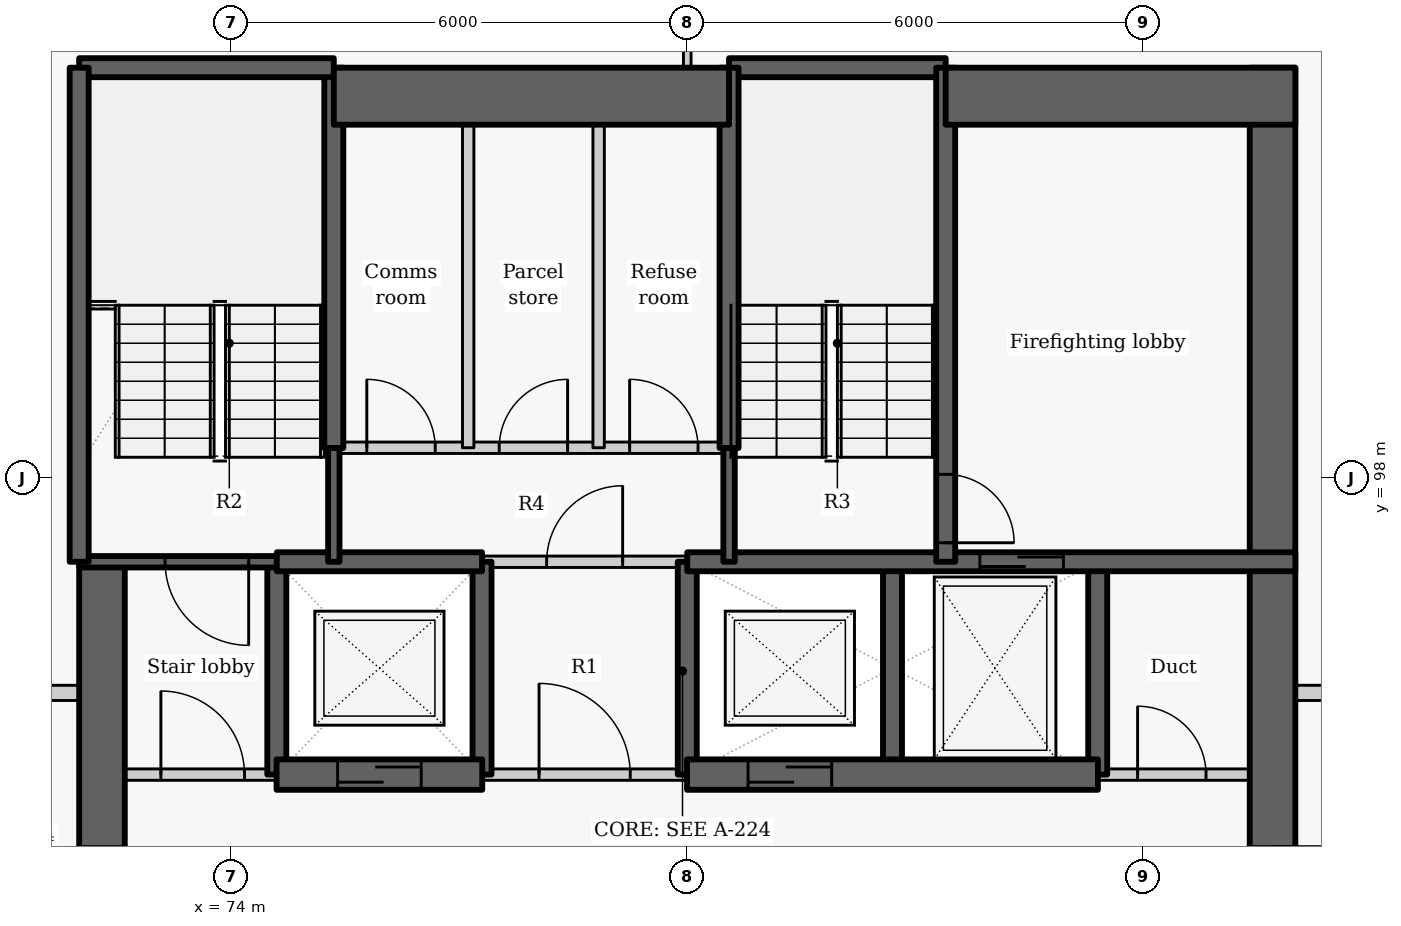
"""IFC4 building model, lengths in metres.
Left out: names, types, materials, properties, quantities, classifications, styles, units other than length and angle.
Written with IfcOpenShell. Run it as: python <this file> out.ifc"""

import sys

from ifc_helpers import new_model, si_unit, direction, frame, frame_2d, origin, place, context, subcontext, project, spatial, rectangle, extrude, element, fill, save


model = new_model("IFC4")
c1 = context("Model", 3, precision=1e-05, world=origin(), true_north=direction((0.0, 1.0)))
c2 = subcontext(c1, "Body", "Model", "MODEL_VIEW")
j1 = project(units=[si_unit("LENGTHUNIT", "METRE"), si_unit("PLANEANGLEUNIT", "RADIAN")], contexts=[c1])
p1 = place(None, origin())
s1 = spatial("IfcSite", under=j1, at=p1, CompositionType="ELEMENT")
p2 = place(p1, origin())
s2 = spatial("IfcBuilding", under=s1, at=p2, CompositionType="ELEMENT")
p3 = place(p2, frame((0.0, 0.0, 127.2)))
s3 = spatial("IfcBuildingStorey", under=s2, at=p3, CompositionType="ELEMENT", Elevation=127.2)
p4 = place(p3, frame((74.6, 94.1, -0.41), z_axis=(0.0, 0.0, 1.0), x_axis=(0.0, 1.0, 0.0)))
e1 = element("IfcWall", 1, at=p4, inside=s3, PredefinedType="SHEAR", context=c2, shape_type="SweptSolid", body=[
    extrude(rectangle(XDim=2.8, YDim=0.25, at=frame_2d((1.4, 0.0))), origin(), (0.0, 0.0, 1.0), 3.435),
])
p5 = place(p3, frame((72.3, 87.8, -0.41), z_axis=(0.0, 0.0, 1.0), x_axis=(0.0, 1.0, 0.0)))
e2 = element("IfcWall", 2, at=p5, inside=s3, PredefinedType="SHEAR", context=c2, shape_type="SweptSolid", body=[
    extrude(rectangle(XDim=9.1, YDim=0.6, at=frame_2d((4.55, 0.0))), origin(), (0.0, 0.0, 1.0), 3.435),
])
p6 = place(p5, frame((3.852, 0.0, 0.41)))
e3 = element("IfcOpeningElement", 3, at=p6, cuts=e2, PredefinedType="OPENING", context=c2, shape_type="SweptSolid", body=[
    extrude(rectangle(XDim=1.5, YDim=2.1, at=frame_2d((0.75, 1.05))), frame((0.0, 0.31, 0.0), z_axis=(0.0, -1.0, 0.0), x_axis=(1.0, 0.0, 0.0)), (0.0, 0.0, 1.0), 0.62),
])
for number, where, z_axis, x_axis in (
    (4, (77.3, 94.1, -0.41), (0.0, 0.0, 1.0), (0.0, 1.0, 0.0)),
    (5, (80.0, 94.1, -0.41), (0.0, 0.0, 1.0), (0.0, 1.0, 0.0)),
    (6, (82.7, 94.1, -0.41), (0.0, 0.0, 1.0), (0.0, 1.0, 0.0)),
    (7, (85.4, 94.1, -0.41), (0.0, 0.0, 1.0), (0.0, 1.0, 0.0)),
):
    element("IfcWall", number, at=place(p3, frame(where, z_axis=z_axis, x_axis=x_axis)), inside=s3, PredefinedType="SHEAR", context=c2, shape_type="SweptSolid", body=[
        extrude(rectangle(XDim=2.8, YDim=0.25, at=frame_2d((1.4, 0.0))), origin(), (0.0, 0.0, 1.0), 3.435),
    ])
p7 = place(p3, frame((87.7, 103.4, -0.41), z_axis=(0.0, 0.0, 1.0), x_axis=(0.0, -1.0, 0.0)))
e8 = element("IfcWall", 8, at=p7, inside=s3, PredefinedType="SHEAR", context=c2, shape_type="SweptSolid", body=[
    extrude(rectangle(XDim=15.6, YDim=0.6, at=frame_2d((7.8, 0.0))), origin(), (0.0, 0.0, 1.0), 3.435),
])
p8 = place(p7, frame((10.248, 0.0, 0.41)))
e9 = element("IfcOpeningElement", 9, at=p8, cuts=e8, PredefinedType="OPENING", context=c2, shape_type="SweptSolid", body=[
    extrude(rectangle(XDim=1.5, YDim=2.1, at=frame_2d((0.75, 1.05))), frame((0.0, 0.31, 0.0), z_axis=(0.0, -1.0, 0.0), x_axis=(1.0, 0.0, 0.0)), (0.0, 0.0, 1.0), 0.62),
])
p9 = place(p3, frame((72.0, 94.1, 0.0), z_axis=(0.0, 0.0, 1.0), x_axis=(1.0, 0.0, 0.0)))
e10 = element("IfcWall", 10, at=p9, inside=s3, PredefinedType="PARTITIONING", context=c2, shape_type="SweptSolid", body=[
    extrude(rectangle(XDim=2.603, YDim=0.15, at=frame_2d((1.302, 0.0))), origin(), (0.0, 0.0, 1.0), 3.025),
])
p10 = place(p9, frame((1.075, 0.0, 0.0)))
e11 = element("IfcOpeningElement", 11, at=p10, cuts=e10, PredefinedType="OPENING", context=c2, shape_type="SweptSolid", body=[
    extrude(rectangle(XDim=1.1, YDim=2.1, at=frame_2d((0.55, 1.05))), frame((0.0, 0.085, 0.0), z_axis=(0.0, -1.0, 0.0), x_axis=(1.0, 0.0, 0.0)), (0.0, 0.0, 1.0), 0.17),
])
p11 = place(p3, frame((77.297, 94.1, 0.0), z_axis=(0.0, 0.0, 1.0), x_axis=(1.0, 0.0, 0.0)))
e12 = element("IfcWall", 12, at=p11, inside=s3, PredefinedType="PARTITIONING", context=c2, shape_type="SweptSolid", body=[
    extrude(rectangle(XDim=2.706, YDim=0.15, at=frame_2d((1.353, 0.0))), origin(), (0.0, 0.0, 1.0), 3.025),
])
p12 = place(p11, frame((0.753, 0.0, 0.0)))
e13 = element("IfcOpeningElement", 13, at=p12, cuts=e12, PredefinedType="OPENING", context=c2, shape_type="SweptSolid", body=[
    extrude(rectangle(XDim=1.2, YDim=2.1, at=frame_2d((0.6, 1.05))), frame((0.0, 0.085, 0.0), z_axis=(0.0, -1.0, 0.0), x_axis=(1.0, 0.0, 0.0)), (0.0, 0.0, 1.0), 0.17),
])
p13 = place(p3, frame((85.397, 94.1, 0.0), z_axis=(0.0, 0.0, 1.0), x_axis=(1.0, 0.0, 0.0)))
e14 = element("IfcWall", 14, at=p13, inside=s3, PredefinedType="PARTITIONING", context=c2, shape_type="SweptSolid", body=[
    extrude(rectangle(XDim=2.603, YDim=0.15, at=frame_2d((1.302, 0.0))), origin(), (0.0, 0.0, 1.0), 3.025),
])
p14 = place(p13, frame((0.528, 0.0, 0.0)))
e15 = element("IfcOpeningElement", 15, at=p14, cuts=e14, PredefinedType="OPENING", context=c2, shape_type="SweptSolid", body=[
    extrude(rectangle(XDim=0.9, YDim=2.1, at=frame_2d((0.45, 1.05))), frame((0.0, 0.085, 0.0), z_axis=(0.0, -1.0, 0.0), x_axis=(1.0, 0.0, 0.0)), (0.0, 0.0, 1.0), 0.17),
])
p15 = place(p3, frame((74.597, 94.1, -0.41), z_axis=(0.0, 0.0, 1.0), x_axis=(1.0, 0.0, 0.0)))
e16 = element("IfcWall", 16, at=p15, inside=s3, PredefinedType="SHEAR", context=c2, shape_type="SweptSolid", body=[
    extrude(rectangle(XDim=2.706, YDim=0.4, at=frame_2d((1.353, 0.0))), origin(), (0.0, 0.0, 1.0), 3.435),
])
p16 = place(p15, frame((0.803, 0.0, 0.41)))
e17 = element("IfcOpeningElement", 17, at=p16, cuts=e16, PredefinedType="OPENING", context=c2, shape_type="SweptSolid", body=[
    extrude(rectangle(XDim=1.1, YDim=2.1, at=frame_2d((0.55, 1.05))), frame((0.0, 0.21, 0.0), z_axis=(0.0, -1.0, 0.0), x_axis=(1.0, 0.0, 0.0)), (0.0, 0.0, 1.0), 0.42),
])
p17 = place(p3, frame((79.997, 94.1, -0.41), z_axis=(0.0, 0.0, 1.0), x_axis=(1.0, 0.0, 0.0)))
e18 = element("IfcWall", 18, at=p17, inside=s3, PredefinedType="SHEAR", context=c2, shape_type="SweptSolid", body=[
    extrude(rectangle(XDim=5.406, YDim=0.4, at=frame_2d((2.703, 0.0))), origin(), (0.0, 0.0, 1.0), 3.435),
])
p18 = place(p17, frame((0.803, 0.0, 0.41)))
e19 = element("IfcOpeningElement", 19, at=p18, cuts=e18, PredefinedType="OPENING", context=c2, shape_type="SweptSolid", body=[
    extrude(rectangle(XDim=1.1, YDim=2.1, at=frame_2d((0.55, 1.05))), frame((0.0, 0.21, 0.0), z_axis=(0.0, -1.0, 0.0), x_axis=(1.0, 0.0, 0.0)), (0.0, 0.0, 1.0), 0.42),
])
p19 = place(p3, frame((74.6, 96.9, -0.41), z_axis=(0.0, 0.0, 1.0), x_axis=(-1.0, 0.0, 0.0)))
e20 = element("IfcWall", 20, at=p19, inside=s3, PredefinedType="SHEAR", context=c2, shape_type="SweptSolid", body=[
    extrude(rectangle(XDim=2.6, YDim=0.15, at=frame_2d((1.3, 0.0))), origin(), (0.0, 0.0, 1.0), 3.435),
])
p20 = place(p19, frame((0.37, 0.0, 0.41)))
e21 = element("IfcOpeningElement", 21, at=p20, cuts=e20, PredefinedType="OPENING", context=c2, shape_type="SweptSolid", body=[
    extrude(rectangle(XDim=1.1, YDim=2.1, at=frame_2d((0.55, 1.05))), frame((0.0, 0.085, 0.0), z_axis=(0.0, -1.0, 0.0), x_axis=(1.0, 0.0, 0.0)), (0.0, 0.0, 1.0), 0.17),
])
p21 = place(p3, frame((74.6, 96.9, -0.41), z_axis=(0.0, 0.0, 1.0), x_axis=(1.0, 0.0, 0.0)))
e22 = element("IfcWall", 22, at=p21, inside=s3, PredefinedType="SHEAR", context=c2, shape_type="SweptSolid", body=[
    extrude(rectangle(XDim=2.7, YDim=0.25, at=frame_2d((1.35, 0.0))), origin(), (0.0, 0.0, 1.0), 3.435),
])
p22 = place(p3, frame((80.0, 96.9, -0.41), z_axis=(0.0, 0.0, 1.0), x_axis=(1.0, 0.0, 0.0)))
e23 = element("IfcWall", 23, at=p22, inside=s3, PredefinedType="SHEAR", context=c2, shape_type="SweptSolid", body=[
    extrude(rectangle(XDim=8.0, YDim=0.25, at=frame_2d((4.0, 0.0))), origin(), (0.0, 0.0, 1.0), 3.435),
])
p23 = place(p22, frame((3.849, 0.0, 0.41)))
e24 = element("IfcOpeningElement", 24, at=p23, cuts=e23, PredefinedType="OPENING", context=c2, shape_type="SweptSolid", body=[
    extrude(rectangle(XDim=1.1, YDim=2.1, at=frame_2d((0.55, 1.05))), frame((0.0, 0.135, 0.0), z_axis=(0.0, -1.0, 0.0), x_axis=(1.0, 0.0, 0.0)), (0.0, 0.0, 1.0), 0.27),
])
p24 = place(p3, frame((77.3, 96.9, 0.0), z_axis=(0.0, 0.0, 1.0), x_axis=(1.0, 0.0, 0.0)))
e25 = element("IfcWall", 25, at=p24, inside=s3, PredefinedType="PARTITIONING", context=c2, shape_type="SweptSolid", body=[
    extrude(rectangle(XDim=2.7, YDim=0.15, at=frame_2d((1.35, 0.0))), origin(), (0.0, 0.0, 1.0), 3.025),
])
p25 = place(p24, frame((0.85, 0.0, 0.0)))
e26 = element("IfcOpeningElement", 26, at=p25, cuts=e25, PredefinedType="OPENING", context=c2, shape_type="SweptSolid", body=[
    extrude(rectangle(XDim=1.0, YDim=2.1, at=frame_2d((0.5, 1.05))), frame((0.0, 0.085, 0.0), z_axis=(0.0, -1.0, 0.0), x_axis=(1.0, 0.0, 0.0)), (0.0, 0.0, 1.0), 0.17),
])
p26 = place(p3, frame((75.35, 96.9, -0.41), z_axis=(0.0, 0.0, 1.0), x_axis=(0.0, 1.0, 0.0)))
e27 = element("IfcWall", 27, at=p26, inside=s3, PredefinedType="SHEAR", context=c2, shape_type="SweptSolid", body=[
    extrude(rectangle(XDim=1.503, YDim=0.15, at=frame_2d((0.751, 0.0))), origin(), (0.0, 0.0, 1.0), 3.435),
])
p27 = place(p3, frame((75.35, 98.397, -0.41), z_axis=(0.0, 0.0, 1.0), x_axis=(0.0, 1.0, 0.0)))
e28 = element("IfcWall", 28, at=p27, inside=s3, PredefinedType="SHEAR", context=c2, shape_type="SweptSolid", body=[
    extrude(rectangle(XDim=5.003, YDim=0.25, at=frame_2d((2.501, 0.0))), origin(), (0.0, 0.0, 1.0), 3.435),
])
p28 = place(p3, frame((72.0, 103.4, 0.0), z_axis=(0.0, 0.0, 1.0), x_axis=(1.0, 0.0, 0.0)))
e29 = element("IfcWall", 29, at=p28, inside=s3, PredefinedType="SHEAR", context=c2, shape_type="SweptSolid", body=[
    extrude(rectangle(XDim=3.35, YDim=0.25, at=frame_2d((1.675, 0.0))), origin(), (0.0, 0.0, 1.0), 3.025),
])
p29 = place(p3, frame((80.55, 103.4, 0.0), z_axis=(0.0, 0.0, 1.0), x_axis=(1.0, 0.0, 0.0)))
e30 = element("IfcWall", 30, at=p29, inside=s3, PredefinedType="SHEAR", context=c2, shape_type="SweptSolid", body=[
    extrude(rectangle(XDim=2.85, YDim=0.25, at=frame_2d((1.425, 0.0))), origin(), (0.0, 0.0, 1.0), 3.025),
])
p30 = place(p3, frame((72.0, 96.9, -0.41), z_axis=(0.0, 0.0, 1.0), x_axis=(0.0, 1.0, 0.0)))
e31 = element("IfcWall", 31, at=p30, inside=s3, PredefinedType="SHEAR", context=c2, shape_type="SweptSolid", body=[
    extrude(rectangle(XDim=6.5, YDim=0.25, at=frame_2d((3.25, 0.0))), origin(), (0.0, 0.0, 1.0), 3.435),
])
p31 = place(p3, frame((83.4, 103.4, -0.41), z_axis=(0.0, 0.0, 1.0), x_axis=(0.0, -1.0, 0.0)))
e32 = element("IfcWall", 32, at=p31, inside=s3, PredefinedType="SHEAR", context=c2, shape_type="SweptSolid", body=[
    extrude(rectangle(XDim=6.5, YDim=0.25, at=frame_2d((3.25, 0.0))), origin(), (0.0, 0.0, 1.0), 3.435),
])
p32 = place(p31, frame((5.35, 0.0, 0.41)))
e33 = element("IfcOpeningElement", 33, at=p32, cuts=e32, PredefinedType="OPENING", context=c2, shape_type="SweptSolid", body=[
    extrude(rectangle(XDim=0.9, YDim=2.1, at=frame_2d((0.45, 1.05))), frame((0.0, 0.135, 0.0), z_axis=(0.0, -1.0, 0.0), x_axis=(1.0, 0.0, 0.0)), (0.0, 0.0, 1.0), 0.27),
])
p33 = place(p3, frame((80.55, 96.9, -0.41), z_axis=(0.0, 0.0, 1.0), x_axis=(0.0, 1.0, 0.0)))
e34 = element("IfcWall", 34, at=p33, inside=s3, PredefinedType="SHEAR", context=c2, shape_type="SweptSolid", body=[
    extrude(rectangle(XDim=1.503, YDim=0.15, at=frame_2d((0.751, 0.0))), origin(), (0.0, 0.0, 1.0), 3.435),
])
p34 = place(p3, frame((80.55, 98.397, -0.41), z_axis=(0.0, 0.0, 1.0), x_axis=(0.0, 1.0, 0.0)))
e35 = element("IfcWall", 35, at=p34, inside=s3, PredefinedType="SHEAR", context=c2, shape_type="SweptSolid", body=[
    extrude(rectangle(XDim=5.003, YDim=0.25, at=frame_2d((2.501, 0.0))), origin(), (0.0, 0.0, 1.0), 3.435),
])
p35 = place(p3, frame((75.35, 103.025, -0.41), z_axis=(0.0, 0.0, 1.0), x_axis=(1.0, 0.0, 0.0)))
e36 = element("IfcWall", 36, at=p35, inside=s3, PredefinedType="SHEAR", context=c2, shape_type="SweptSolid", body=[
    extrude(rectangle(XDim=5.2, YDim=0.75, at=frame_2d((2.6, 0.0))), origin(), (0.0, 0.0, 1.0), 3.435),
])
p36 = place(p3, frame((83.4, 103.025, -0.41), z_axis=(0.0, 0.0, 1.0), x_axis=(1.0, 0.0, 0.0)))
e37 = element("IfcWall", 37, at=p36, inside=s3, PredefinedType="SHEAR", context=c2, shape_type="SweptSolid", body=[
    extrude(rectangle(XDim=4.6, YDim=0.75, at=frame_2d((2.3, 0.0))), origin(), (0.0, 0.0, 1.0), 3.435),
])
p37 = place(p3, frame((75.35, 98.4, 0.0), z_axis=(0.0, 0.0, 1.0), x_axis=(1.0, 0.0, 0.0)))
e38 = element("IfcWall", 38, at=p37, inside=s3, PredefinedType="PARTITIONING", context=c2, shape_type="SweptSolid", body=[
    extrude(rectangle(XDim=5.2, YDim=0.15, at=frame_2d((2.6, 0.0))), origin(), (0.0, 0.0, 1.0), 3.025),
])
p38 = place(p37, frame((0.434, 0.0, 0.0)))
e39 = element("IfcOpeningElement", 39, at=p38, cuts=e38, PredefinedType="OPENING", context=c2, shape_type="SweptSolid", body=[
    extrude(rectangle(XDim=0.9, YDim=2.1, at=frame_2d((0.45, 1.05))), frame((0.0, 0.085, 0.0), z_axis=(0.0, -1.0, 0.0), x_axis=(1.0, 0.0, 0.0)), (0.0, 0.0, 1.0), 0.17),
])
p39 = place(p37, frame((2.176, 0.0, 0.0)))
e40 = element("IfcOpeningElement", 40, at=p39, cuts=e38, PredefinedType="OPENING", context=c2, shape_type="SweptSolid", body=[
    extrude(rectangle(XDim=0.9, YDim=2.1, at=frame_2d((0.45, 1.05))), frame((0.0, 0.085, 0.0), z_axis=(0.0, -1.0, 0.0), x_axis=(1.0, 0.0, 0.0)), (0.0, 0.0, 1.0), 0.17),
])
p40 = place(p37, frame((3.892, 0.0, 0.0)))
e41 = element("IfcOpeningElement", 41, at=p40, cuts=e38, PredefinedType="OPENING", context=c2, shape_type="SweptSolid", body=[
    extrude(rectangle(XDim=0.9, YDim=2.1, at=frame_2d((0.45, 1.05))), frame((0.0, 0.085, 0.0), z_axis=(0.0, -1.0, 0.0), x_axis=(1.0, 0.0, 0.0)), (0.0, 0.0, 1.0), 0.17),
])
for number, where, z_axis, x_axis in (
    (42, (77.118, 98.4, 0.0), (0.0, 0.0, 1.0), (0.0, 1.0, 0.0)),
    (43, (78.834, 98.4, 0.0), (0.0, 0.0, 1.0), (0.0, 1.0, 0.0)),
):
    element("IfcWall", number, at=place(p3, frame(where, z_axis=z_axis, x_axis=x_axis)), inside=s3, PredefinedType="PARTITIONING", context=c2, shape_type="SweptSolid", body=[
        extrude(rectangle(XDim=5.0, YDim=0.15, at=frame_2d((2.5, 0.0))), origin(), (0.0, 0.0, 1.0), 3.025),
    ])
p41 = place(p3, frame((69.537, 95.175, 0.0), z_axis=(0.0, 0.0, 1.0), x_axis=(1.0, 0.0, 0.0)))
e44 = element("IfcWall", 44, at=p41, inside=s3, PredefinedType="PARTITIONING", context=c2, shape_type="SweptSolid", body=[
    extrude(rectangle(XDim=2.463, YDim=0.2, at=frame_2d((1.231, 0.0))), origin(), (0.0, 0.0, 1.0), 2.505),
])
p42 = place(p3, frame((88.0, 95.175, 0.0), z_axis=(0.0, 0.0, 1.0), x_axis=(1.0, 0.0, 0.0)))
e45 = element("IfcWall", 45, at=p42, inside=s3, PredefinedType="PARTITIONING", context=c2, shape_type="SweptSolid", body=[
    extrude(rectangle(XDim=1.423, YDim=0.2, at=frame_2d((0.711, 0.0))), origin(), (0.0, 0.0, 1.0), 3.025),
])
p43 = place(p3, frame((80.0, 103.4, 0.0), z_axis=(0.0, 0.0, 1.0), x_axis=(0.0, 1.0, 0.0)))
e46 = element("IfcWall", 46, at=p43, inside=s3, PredefinedType="PARTITIONING", context=c2, shape_type="SweptSolid", body=[
    extrude(rectangle(XDim=0.3, YDim=0.1, at=frame_2d((0.15, 0.0))), origin(), (0.0, 0.0, 1.0), 3.025),
])
p44 = place(p10, origin())
e47 = element("IfcDoor", 47, at=p44, inside=s3, OperationType="SINGLE_SWING_LEFT", PredefinedType="DOOR", context=c2, shape_type="SweptSolid", body=[
    extrude(rectangle(XDim=1.1, YDim=2.1, at=frame_2d((0.55, 1.05))), frame((0.0, 0.025, 0.0), z_axis=(0.0, -1.0, 0.0), x_axis=(1.0, 0.0, 0.0)), (0.0, 0.0, 1.0), 0.05),
])
fill(e11, e47)
p45 = place(p16, origin())
e48 = element("IfcDoor", 48, at=p45, inside=s3, OperationType="SLIDING_TO_LEFT", PredefinedType="DOOR", context=c2, shape_type="SweptSolid", body=[
    extrude(rectangle(XDim=1.1, YDim=2.1, at=frame_2d((0.55, 1.05))), frame((0.0, 0.025, 0.0), z_axis=(0.0, -1.0, 0.0), x_axis=(1.0, 0.0, 0.0)), (0.0, 0.0, 1.0), 0.05),
])
fill(e17, e48)
p46 = place(p12, origin())
e49 = element("IfcDoor", 49, at=p46, inside=s3, OperationType="DOUBLE_DOOR_SINGLE_SWING", PredefinedType="DOOR", context=c2, shape_type="SweptSolid", body=[
    extrude(rectangle(XDim=1.2, YDim=2.1, at=frame_2d((0.6, 1.05))), frame((0.0, 0.025, 0.0), z_axis=(0.0, -1.0, 0.0), x_axis=(1.0, 0.0, 0.0)), (0.0, 0.0, 1.0), 0.05),
])
fill(e13, e49)
p47 = place(p18, origin())
e50 = element("IfcDoor", 50, at=p47, inside=s3, OperationType="SLIDING_TO_LEFT", PredefinedType="DOOR", context=c2, shape_type="SweptSolid", body=[
    extrude(rectangle(XDim=1.1, YDim=2.1, at=frame_2d((0.55, 1.05))), frame((0.0, 0.025, 0.0), z_axis=(0.0, -1.0, 0.0), x_axis=(1.0, 0.0, 0.0)), (0.0, 0.0, 1.0), 0.05),
])
fill(e19, e50)
p48 = place(p23, origin())
e51 = element("IfcDoor", 51, at=p48, inside=s3, OperationType="SLIDING_TO_LEFT", PredefinedType="DOOR", context=c2, shape_type="SweptSolid", body=[
    extrude(rectangle(XDim=1.1, YDim=2.1, at=frame_2d((0.55, 1.05))), frame((0.0, 0.025, 0.0), z_axis=(0.0, -1.0, 0.0), x_axis=(1.0, 0.0, 0.0)), (0.0, 0.0, 1.0), 0.05),
])
fill(e24, e51)
p49 = place(p14, origin())
e52 = element("IfcDoor", 52, at=p49, inside=s3, OperationType="SINGLE_SWING_LEFT", PredefinedType="DOOR", context=c2, shape_type="SweptSolid", body=[
    extrude(rectangle(XDim=0.9, YDim=2.1, at=frame_2d((0.45, 1.05))), frame((0.0, 0.025, 0.0), z_axis=(0.0, -1.0, 0.0), x_axis=(1.0, 0.0, 0.0)), (0.0, 0.0, 1.0), 0.05),
])
fill(e15, e52)
p50 = place(p25, origin())
e53 = element("IfcDoor", 53, at=p50, inside=s3, OperationType="SINGLE_SWING_RIGHT", PredefinedType="DOOR", context=c2, shape_type="SweptSolid", body=[
    extrude(rectangle(XDim=1.0, YDim=2.1, at=frame_2d((0.5, 1.05))), frame((0.0, 0.025, 0.0), z_axis=(0.0, -1.0, 0.0), x_axis=(1.0, 0.0, 0.0)), (0.0, 0.0, 1.0), 0.05),
])
fill(e26, e53)
p51 = place(p38, origin())
e54 = element("IfcDoor", 54, at=p51, inside=s3, OperationType="SINGLE_SWING_LEFT", PredefinedType="DOOR", context=c2, shape_type="SweptSolid", body=[
    extrude(rectangle(XDim=0.9, YDim=2.1, at=frame_2d((0.45, 1.05))), frame((0.0, 0.025, 0.0), z_axis=(0.0, -1.0, 0.0), x_axis=(1.0, 0.0, 0.0)), (0.0, 0.0, 1.0), 0.05),
])
fill(e39, e54)
p52 = place(p39, origin())
e55 = element("IfcDoor", 55, at=p52, inside=s3, OperationType="SINGLE_SWING_RIGHT", PredefinedType="DOOR", context=c2, shape_type="SweptSolid", body=[
    extrude(rectangle(XDim=0.9, YDim=2.1, at=frame_2d((0.45, 1.05))), frame((0.0, 0.025, 0.0), z_axis=(0.0, -1.0, 0.0), x_axis=(1.0, 0.0, 0.0)), (0.0, 0.0, 1.0), 0.05),
])
fill(e40, e55)
p53 = place(p40, origin())
e56 = element("IfcDoor", 56, at=p53, inside=s3, OperationType="SINGLE_SWING_LEFT", PredefinedType="DOOR", context=c2, shape_type="SweptSolid", body=[
    extrude(rectangle(XDim=0.9, YDim=2.1, at=frame_2d((0.45, 1.05))), frame((0.0, 0.025, 0.0), z_axis=(0.0, -1.0, 0.0), x_axis=(1.0, 0.0, 0.0)), (0.0, 0.0, 1.0), 0.05),
])
fill(e41, e56)
p54 = place(p20, origin())
e57 = element("IfcDoor", 57, at=p54, inside=s3, OperationType="SINGLE_SWING_LEFT", PredefinedType="DOOR", context=c2, shape_type="SweptSolid", body=[
    extrude(rectangle(XDim=1.1, YDim=2.1, at=frame_2d((0.55, 1.05))), frame((0.0, 0.025, 0.0), z_axis=(0.0, -1.0, 0.0), x_axis=(1.0, 0.0, 0.0)), (0.0, 0.0, 1.0), 0.05),
])
fill(e21, e57)
p55 = place(p32, origin())
e58 = element("IfcDoor", 58, at=p55, inside=s3, OperationType="SINGLE_SWING_RIGHT", PredefinedType="DOOR", context=c2, shape_type="SweptSolid", body=[
    extrude(rectangle(XDim=0.9, YDim=2.1, at=frame_2d((0.45, 1.05))), frame((0.0, 0.025, 0.0), z_axis=(0.0, -1.0, 0.0), x_axis=(1.0, 0.0, 0.0)), (0.0, 0.0, 1.0), 0.05),
])
fill(e33, e58)
p56 = place(p8, origin())
e59 = element("IfcDoor", 59, at=p56, inside=s3, OperationType="DOUBLE_DOOR_SINGLE_SWING", PredefinedType="DOOR", context=c2, shape_type="SweptSolid", body=[
    extrude(rectangle(XDim=1.5, YDim=2.1, at=frame_2d((0.75, 1.05))), frame((0.0, 0.025, 0.0), z_axis=(0.0, -1.0, 0.0), x_axis=(1.0, 0.0, 0.0)), (0.0, 0.0, 1.0), 0.05),
])
fill(e9, e59)
p57 = place(p6, origin())
e60 = element("IfcDoor", 60, at=p57, inside=s3, OperationType="DOUBLE_DOOR_SINGLE_SWING", PredefinedType="DOOR", context=c2, shape_type="SweptSolid", body=[
    extrude(rectangle(XDim=1.5, YDim=2.1, at=frame_2d((0.75, 1.05))), frame((0.0, 0.025, 0.0), z_axis=(0.0, -1.0, 0.0), x_axis=(1.0, 0.0, 0.0)), (0.0, 0.0, 1.0), 0.05),
])
fill(e3, e60)
save(model, sys.argv[1])
